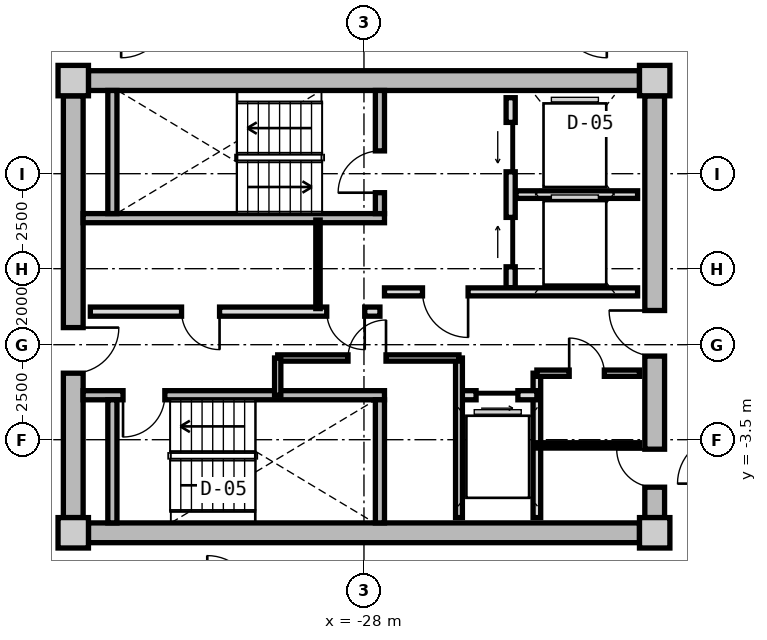
"""IFC4 building model, lengths in metres.
Left out: names, types, materials, properties, quantities, classifications, styles, units other than length and angle.
Written with IfcOpenShell. Run it as: python <this file> out.ifc"""

import sys

from ifc_helpers import new_model, si_unit, direction, frame, frame_2d, origin, origin_2d, place, context, subcontext, project, spatial, rectangle, extrude, source, transform, mapped, element, fill, save


model = new_model("IFC4")
c1 = context("Model", 3, precision=1e-05, world=origin(), true_north=direction((0.0, 1.0)))
c2 = subcontext(c1, "Body", "Model", "MODEL_VIEW")
j1 = project(units=[si_unit("LENGTHUNIT", "METRE"), si_unit("PLANEANGLEUNIT", "RADIAN")], contexts=[c1])
p1 = place(None, origin())
s1 = spatial("IfcSite", under=j1, at=p1, CompositionType="ELEMENT")
p2 = place(p1, origin())
s2 = spatial("IfcBuilding", under=s1, at=p2, CompositionType="ELEMENT")
p3 = place(p2, frame((0.0, 0.0, 226.1)))
s3 = spatial("IfcBuildingStorey", under=s2, at=p3, CompositionType="ELEMENT", Elevation=226.1)
m1 = source(origin(), c2, "Body", "SweptSolid", [
    extrude(rectangle(XDim=0.8, YDim=0.8, at=origin_2d()), origin(), (0.0, 0.0, 1.0), 3.05),
])
for number, where, z_axis, x_axis in (
    (1, (-35.65, -5.95, 0.0), (0.0, 0.0, 1.0), (1.0, 0.0, 0.0)),
    (2, (-20.35, -5.95, 0.0), (0.0, 0.0, 1.0), (1.0, 0.0, 0.0)),
    (3, (-20.35, 5.95, 0.0), (0.0, 0.0, 1.0), (1.0, 0.0, 0.0)),
    (4, (-35.65, 5.95, 0.0), (0.0, 0.0, 1.0), (1.0, 0.0, 0.0)),
):
    element("IfcColumn", number, at=place(p3, frame(where, z_axis=z_axis, x_axis=x_axis)), inside=s3, PredefinedType="COLUMN", context=c2, shape_type="MappedRepresentation", body=[
        mapped(m1, transform((0.0, 0.0, 0.0), x_axis=(1.0, 0.0, 0.0), y_axis=(0.0, 1.0, 0.0), z_axis=(0.0, 0.0, 1.0), scale=1.0)),
    ])
m2 = source(origin(), c2, "Body", "SweptSolid", [
    extrude(rectangle(XDim=14.5, YDim=0.52, at=frame_2d((7.25, 0.0))), origin(), (0.0, 0.0, 1.0), 2.76),
])
for number, where, z_axis, x_axis in (
    (5, (-35.25, 5.95, 0.0), (0.0, 0.0, 1.0), (1.0, 0.0, 0.0)),
    (6, (-20.75, -5.95, 0.0), (0.0, 0.0, 1.0), (-1.0, 0.0, 0.0)),
):
    element("IfcWall", number, at=place(p3, frame(where, z_axis=z_axis, x_axis=x_axis)), inside=s3, PredefinedType="SHEAR", context=c2, shape_type="MappedRepresentation", body=[
        mapped(m2, transform((0.0, 0.0, 0.0), x_axis=(1.0, 0.0, 0.0), y_axis=(0.0, 1.0, 0.0), z_axis=(0.0, 0.0, 1.0), scale=1.0)),
    ])
m3 = source(origin(), c2, "Body", "SweptSolid", [
    extrude(rectangle(XDim=11.1, YDim=0.52, at=frame_2d((5.55, 0.0))), origin(), (0.0, 0.0, 1.0), 2.76),
])
p4 = place(p3, frame((-35.65, -5.55, 0.0), z_axis=(0.0, 0.0, 1.0), x_axis=(0.0, 1.0, 0.0)))
e7 = element("IfcWall", 7, at=p4, inside=s3, PredefinedType="SHEAR", context=c2, shape_type="MappedRepresentation", body=[
    mapped(m3, transform((0.0, 0.0, 0.0), x_axis=(1.0, 0.0, 0.0), y_axis=(0.0, 1.0, 0.0), z_axis=(0.0, 0.0, 1.0), scale=1.0)),
])
p5 = place(p4, frame((3.8, 0.0, 0.0)))
e8 = element("IfcOpeningElement", 8, at=p5, cuts=e7, PredefinedType="OPENING", context=c2, shape_type="SweptSolid", body=[
    extrude(rectangle(XDim=1.2, YDim=2.15, at=frame_2d((0.6, 1.075))), frame((0.0, 0.27, 0.0), z_axis=(0.0, -1.0, 0.0), x_axis=(1.0, 0.0, 0.0)), (0.0, 0.0, 1.0), 0.54),
])
p6 = place(p3, frame((-20.35, 5.55, 0.0), z_axis=(0.0, 0.0, 1.0), x_axis=(0.0, -1.0, 0.0)))
e9 = element("IfcWall", 9, at=p6, inside=s3, PredefinedType="SHEAR", context=c2, shape_type="MappedRepresentation", body=[
    mapped(m3, transform((0.0, 0.0, 0.0), x_axis=(1.0, 0.0, 0.0), y_axis=(0.0, 1.0, 0.0), z_axis=(0.0, 0.0, 1.0), scale=1.0)),
])
p7 = place(p6, frame((5.65, 0.0, 0.0)))
e10 = element("IfcOpeningElement", 10, at=p7, cuts=e9, PredefinedType="OPENING", context=c2, shape_type="SweptSolid", body=[
    extrude(rectangle(XDim=1.2, YDim=2.15, at=frame_2d((0.6, 1.075))), frame((0.0, 0.27, 0.0), z_axis=(0.0, -1.0, 0.0), x_axis=(1.0, 0.0, 0.0)), (0.0, 0.0, 1.0), 0.54),
])
p8 = place(p6, frame((9.3, 0.0, 0.0)))
e11 = element("IfcOpeningElement", 11, at=p8, cuts=e9, PredefinedType="OPENING", context=c2, shape_type="SweptSolid", body=[
    extrude(rectangle(XDim=1.0, YDim=2.1, at=frame_2d((0.5, 1.05))), frame((0.0, 0.27, 0.0), z_axis=(0.0, -1.0, 0.0), x_axis=(1.0, 0.0, 0.0)), (0.0, 0.0, 1.0), 0.54),
])
m4 = source(origin(), c2, "Body", "SweptSolid", [
    extrude(rectangle(XDim=7.93, YDim=0.24, at=frame_2d((3.965, 0.0))), origin(), (0.0, 0.0, 1.0), 2.76),
])
p9 = place(p3, frame((-35.39, 2.33, 0.0), z_axis=(0.0, 0.0, 1.0), x_axis=(1.0, 0.0, 0.0)))
e12 = element("IfcWall", 12, at=p9, inside=s3, PredefinedType="PARTITIONING", context=c2, shape_type="MappedRepresentation", body=[
    mapped(m4, transform((0.0, 0.0, 0.0), x_axis=(1.0, 0.0, 0.0), y_axis=(0.0, 1.0, 0.0), z_axis=(0.0, 0.0, 1.0), scale=1.0)),
])
m5 = source(origin(), c2, "Body", "SweptSolid", [
    extrude(rectangle(XDim=3.24, YDim=0.24, at=frame_2d((1.62, 0.0))), origin(), (0.0, 0.0, 1.0), 2.76),
])
p10 = place(p3, frame((-34.62, 2.45, 0.0), z_axis=(0.0, 0.0, 1.0), x_axis=(0.0, 1.0, 0.0)))
e13 = element("IfcWall", 13, at=p10, inside=s3, PredefinedType="PARTITIONING", context=c2, shape_type="MappedRepresentation", body=[
    mapped(m5, transform((0.0, 0.0, 0.0), x_axis=(1.0, 0.0, 0.0), y_axis=(0.0, 1.0, 0.0), z_axis=(0.0, 0.0, 1.0), scale=1.0)),
])
p11 = place(p3, frame((-27.58, 2.45, 0.0), z_axis=(0.0, 0.0, 1.0), x_axis=(0.0, 1.0, 0.0)))
e14 = element("IfcWall", 14, at=p11, inside=s3, PredefinedType="PARTITIONING", context=c2, shape_type="MappedRepresentation", body=[
    mapped(m5, transform((0.0, 0.0, 0.0), x_axis=(1.0, 0.0, 0.0), y_axis=(0.0, 1.0, 0.0), z_axis=(0.0, 0.0, 1.0), scale=1.0)),
])
p12 = place(p11, frame((0.55, 0.0, 0.0)))
e15 = element("IfcOpeningElement", 15, at=p12, cuts=e14, PredefinedType="OPENING", context=c2, shape_type="SweptSolid", body=[
    extrude(rectangle(XDim=1.1, YDim=2.15, at=frame_2d((0.55, 1.075))), frame((0.0, 0.13, 0.0), z_axis=(0.0, -1.0, 0.0), x_axis=(1.0, 0.0, 0.0)), (0.0, 0.0, 1.0), 0.26),
])
p13 = place(p3, frame((-35.39, -2.33, 0.0), z_axis=(0.0, 0.0, 1.0), x_axis=(1.0, 0.0, 0.0)))
e16 = element("IfcWall", 16, at=p13, inside=s3, PredefinedType="PARTITIONING", context=c2, shape_type="MappedRepresentation", body=[
    mapped(m4, transform((0.0, 0.0, 0.0), x_axis=(1.0, 0.0, 0.0), y_axis=(0.0, 1.0, 0.0), z_axis=(0.0, 0.0, 1.0), scale=1.0)),
])
p14 = place(p13, frame((1.05, 0.0, 0.0)))
e17 = element("IfcOpeningElement", 17, at=p14, cuts=e16, PredefinedType="OPENING", context=c2, shape_type="SweptSolid", body=[
    extrude(rectangle(XDim=1.1, YDim=2.15, at=frame_2d((0.55, 1.075))), frame((0.0, 0.13, 0.0), z_axis=(0.0, -1.0, 0.0), x_axis=(1.0, 0.0, 0.0)), (0.0, 0.0, 1.0), 0.26),
])
for number, where, z_axis, x_axis in (
    (18, (-34.62, -5.69, 0.0), (0.0, 0.0, 1.0), (0.0, 1.0, 0.0)),
    (19, (-27.58, -5.69, 0.0), (0.0, 0.0, 1.0), (0.0, 1.0, 0.0)),
):
    element("IfcWall", number, at=place(p3, frame(where, z_axis=z_axis, x_axis=x_axis)), inside=s3, PredefinedType="PARTITIONING", context=c2, shape_type="MappedRepresentation", body=[
        mapped(m5, transform((0.0, 0.0, 0.0), x_axis=(1.0, 0.0, 0.0), y_axis=(0.0, 1.0, 0.0), z_axis=(0.0, 0.0, 1.0), scale=1.0)),
    ])
m6 = source(origin(), c2, "Body", "SweptSolid", [
    extrude(rectangle(XDim=5.0, YDim=0.24, at=frame_2d((2.5, 0.0))), origin(), (0.0, 0.0, 1.0), 2.745),
])
p15 = place(p3, frame((-24.14, 0.5, 0.0), z_axis=(0.0, 0.0, 1.0), x_axis=(0.0, 1.0, 0.0)))
e20 = element("IfcWall", 20, at=p15, inside=s3, PredefinedType="PARTITIONING", context=c2, shape_type="MappedRepresentation", body=[
    mapped(m6, transform((0.0, 0.0, 0.0), x_axis=(1.0, 0.0, 0.0), y_axis=(0.0, 1.0, 0.0), z_axis=(0.0, 0.0, 1.0), scale=1.0)),
])
p16 = place(p15, frame((3.05, 0.0, 0.0)))
e21 = element("IfcOpeningElement", 21, at=p16, cuts=e20, PredefinedType="OPENING", context=c2, shape_type="SweptSolid", body=[
    extrude(rectangle(XDim=1.3, YDim=2.2, at=frame_2d((0.65, 1.1))), frame((0.0, 0.13, 0.0), z_axis=(0.0, -1.0, 0.0), x_axis=(1.0, 0.0, 0.0)), (0.0, 0.0, 1.0), 0.26),
])
p17 = place(p15, frame((0.55, 0.0, 0.0)))
e22 = element("IfcOpeningElement", 22, at=p17, cuts=e20, PredefinedType="OPENING", context=c2, shape_type="SweptSolid", body=[
    extrude(rectangle(XDim=1.3, YDim=2.2, at=frame_2d((0.65, 1.1))), frame((0.0, 0.13, 0.0), z_axis=(0.0, -1.0, 0.0), x_axis=(1.0, 0.0, 0.0)), (0.0, 0.0, 1.0), 0.26),
])
m7 = source(origin(), c2, "Body", "SweptSolid", [
    extrude(rectangle(XDim=3.2, YDim=0.2, at=frame_2d((1.6, 0.0))), origin(), (0.0, 0.0, 1.0), 2.745),
])
p18 = place(p3, frame((-24.0, 2.95, 0.0), z_axis=(0.0, 0.0, 1.0), x_axis=(1.0, 0.0, 0.0)))
e23 = element("IfcWall", 23, at=p18, inside=s3, PredefinedType="PARTITIONING", context=c2, shape_type="MappedRepresentation", body=[
    mapped(m7, transform((0.0, 0.0, 0.0), x_axis=(1.0, 0.0, 0.0), y_axis=(0.0, 1.0, 0.0), z_axis=(0.0, 0.0, 1.0), scale=1.0)),
])
m8 = source(origin(), c2, "Body", "SweptSolid", [
    extrude(rectangle(XDim=6.66, YDim=0.21, at=frame_2d((3.33, 0.0))), origin(), (0.0, 0.0, 1.0), 2.745),
])
p19 = place(p3, frame((-27.46, 0.39, 0.0), z_axis=(0.0, 0.0, 1.0), x_axis=(1.0, 0.0, 0.0)))
e24 = element("IfcWall", 24, at=p19, inside=s3, PredefinedType="PARTITIONING", context=c2, shape_type="MappedRepresentation", body=[
    mapped(m8, transform((0.0, 0.0, 0.0), x_axis=(1.0, 0.0, 0.0), y_axis=(0.0, 1.0, 0.0), z_axis=(0.0, 0.0, 1.0), scale=1.0)),
])
p20 = place(p19, frame((1.0, 0.0, 0.0)))
e25 = element("IfcOpeningElement", 25, at=p20, cuts=e24, PredefinedType="OPENING", context=c2, shape_type="SweptSolid", body=[
    extrude(rectangle(XDim=1.2, YDim=2.15, at=frame_2d((0.6, 1.075))), frame((0.0, 0.115, 0.0), z_axis=(0.0, -1.0, 0.0), x_axis=(1.0, 0.0, 0.0)), (0.0, 0.0, 1.0), 0.23),
])
m9 = source(origin(), c2, "Body", "SweptSolid", [
    extrude(rectangle(XDim=7.62, YDim=0.24, at=frame_2d((3.81, 0.0))), origin(), (0.0, 0.0, 1.0), 2.745),
])
p21 = place(p3, frame((-35.2, -0.13, 0.0), z_axis=(0.0, 0.0, 1.0), x_axis=(1.0, 0.0, 0.0)))
e26 = element("IfcWall", 26, at=p21, inside=s3, PredefinedType="PARTITIONING", context=c2, shape_type="MappedRepresentation", body=[
    mapped(m9, transform((0.0, 0.0, 0.0), x_axis=(1.0, 0.0, 0.0), y_axis=(0.0, 1.0, 0.0), z_axis=(0.0, 0.0, 1.0), scale=1.0)),
])
p22 = place(p21, frame((6.22, 0.0, 0.0)))
e27 = element("IfcOpeningElement", 27, at=p22, cuts=e26, PredefinedType="OPENING", context=c2, shape_type="SweptSolid", body=[
    extrude(rectangle(XDim=1.0, YDim=2.1, at=frame_2d((0.5, 1.05))), frame((0.0, 0.13, 0.0), z_axis=(0.0, -1.0, 0.0), x_axis=(1.0, 0.0, 0.0)), (0.0, 0.0, 1.0), 0.26),
])
p23 = place(p21, frame((2.4, 0.0, 0.0)))
e28 = element("IfcOpeningElement", 28, at=p23, cuts=e26, PredefinedType="OPENING", context=c2, shape_type="SweptSolid", body=[
    extrude(rectangle(XDim=1.0, YDim=2.1, at=frame_2d((0.5, 1.05))), frame((0.0, 0.13, 0.0), z_axis=(0.0, -1.0, 0.0), x_axis=(1.0, 0.0, 0.0)), (0.0, 0.0, 1.0), 0.26),
])
m10 = source(origin(), c2, "Body", "SweptSolid", [
    extrude(rectangle(XDim=2.33, YDim=0.115, at=frame_2d((1.165, 0.0))), origin(), (0.0, 0.0, 1.0), 2.745),
])
p24 = place(p3, frame((-29.21, -0.05, 0.0), z_axis=(0.0, 0.0, 1.0), x_axis=(0.0, 1.0, 0.0)))
e29 = element("IfcWall", 29, at=p24, inside=s3, PredefinedType="PARTITIONING", context=c2, shape_type="MappedRepresentation", body=[
    mapped(m10, transform((0.0, 0.0, 0.0), x_axis=(1.0, 0.0, 0.0), y_axis=(0.0, 1.0, 0.0), z_axis=(0.0, 0.0, 1.0), scale=1.0)),
])
m11 = source(origin(), c2, "Body", "SweptSolid", [
    extrude(rectangle(XDim=3.8, YDim=0.2, at=frame_2d((1.9, 0.0))), origin(), (0.0, 0.0, 1.0), 2.745),
])
p25 = place(p3, frame((-23.45, -5.55, 0.0), z_axis=(0.0, 0.0, 1.0), x_axis=(0.0, 1.0, 0.0)))
e30 = element("IfcWall", 30, at=p25, inside=s3, PredefinedType="PARTITIONING", context=c2, shape_type="MappedRepresentation", body=[
    mapped(m11, transform((0.0, 0.0, 0.0), x_axis=(1.0, 0.0, 0.0), y_axis=(0.0, 1.0, 0.0), z_axis=(0.0, 0.0, 1.0), scale=1.0)),
])
m12 = source(origin(), c2, "Body", "SweptSolid", [
    extrude(rectangle(XDim=2.05, YDim=0.24, at=frame_2d((1.025, 0.0))), origin(), (0.0, 0.0, 1.0), 2.745),
])
p26 = place(p3, frame((-25.5, -2.33, 0.0), z_axis=(0.0, 0.0, 1.0), x_axis=(1.0, 0.0, 0.0)))
e31 = element("IfcWall", 31, at=p26, inside=s3, PredefinedType="PARTITIONING", context=c2, shape_type="MappedRepresentation", body=[
    mapped(m12, transform((0.0, 0.0, 0.0), x_axis=(1.0, 0.0, 0.0), y_axis=(0.0, 1.0, 0.0), z_axis=(0.0, 0.0, 1.0), scale=1.0)),
])
p27 = place(p26, frame((0.45, 0.0, 0.0)))
e32 = element("IfcOpeningElement", 32, at=p27, cuts=e31, PredefinedType="OPENING", context=c2, shape_type="SweptSolid", body=[
    extrude(rectangle(XDim=1.1, YDim=2.2, at=frame_2d((0.55, 1.1))), frame((0.0, 0.13, 0.0), z_axis=(0.0, -1.0, 0.0), x_axis=(1.0, 0.0, 0.0)), (0.0, 0.0, 1.0), 0.26),
])
m13 = source(origin(), c2, "Body", "SweptSolid", [
    extrude(rectangle(XDim=4.2, YDim=0.18, at=frame_2d((2.1, 0.0))), origin(), (0.0, 0.0, 1.0), 2.745),
])
p28 = place(p3, frame((-25.5, -5.55, 0.0), z_axis=(0.0, 0.0, 1.0), x_axis=(0.0, 1.0, 0.0)))
e33 = element("IfcWall", 33, at=p28, inside=s3, PredefinedType="PARTITIONING", context=c2, shape_type="MappedRepresentation", body=[
    mapped(m13, transform((0.0, 0.0, 0.0), x_axis=(1.0, 0.0, 0.0), y_axis=(0.0, 1.0, 0.0), z_axis=(0.0, 0.0, 1.0), scale=1.0)),
])
m14 = source(origin(), c2, "Body", "SweptSolid", [
    extrude(rectangle(XDim=4.77, YDim=0.165, at=frame_2d((2.385, 0.0))), origin(), (0.0, 0.0, 1.0), 2.745),
])
p29 = place(p3, frame((-30.27, -1.35, 0.0), z_axis=(0.0, 0.0, 1.0), x_axis=(1.0, 0.0, 0.0)))
e34 = element("IfcWall", 34, at=p29, inside=s3, PredefinedType="PARTITIONING", context=c2, shape_type="MappedRepresentation", body=[
    mapped(m14, transform((0.0, 0.0, 0.0), x_axis=(1.0, 0.0, 0.0), y_axis=(0.0, 1.0, 0.0), z_axis=(0.0, 0.0, 1.0), scale=1.0)),
])
p30 = place(p29, frame((1.85, 0.0, 0.0)))
e35 = element("IfcOpeningElement", 35, at=p30, cuts=e34, PredefinedType="OPENING", context=c2, shape_type="SweptSolid", body=[
    extrude(rectangle(XDim=1.0, YDim=2.1, at=frame_2d((0.5, 1.05))), frame((0.0, 0.093, 0.0), z_axis=(0.0, -1.0, 0.0), x_axis=(1.0, 0.0, 0.0)), (0.0, 0.0, 1.0), 0.185),
])
m15 = source(origin(), c2, "Body", "SweptSolid", [
    extrude(rectangle(XDim=0.98, YDim=0.165, at=frame_2d((0.49, 0.0))), origin(), (0.0, 0.0, 1.0), 2.745),
])
p31 = place(p3, frame((-30.27, -2.33, 0.0), z_axis=(0.0, 0.0, 1.0), x_axis=(0.0, 1.0, 0.0)))
e36 = element("IfcWall", 36, at=p31, inside=s3, PredefinedType="PARTITIONING", context=c2, shape_type="MappedRepresentation", body=[
    mapped(m15, transform((0.0, 0.0, 0.0), x_axis=(1.0, 0.0, 0.0), y_axis=(0.0, 1.0, 0.0), z_axis=(0.0, 0.0, 1.0), scale=1.0)),
])
m16 = source(origin(), c2, "Body", "SweptSolid", [
    extrude(rectangle(XDim=2.7, YDim=0.165, at=frame_2d((1.35, 0.0))), origin(), (0.0, 0.0, 1.0), 2.745),
])
p32 = place(p3, frame((-23.45, -1.75, 0.0), z_axis=(0.0, 0.0, 1.0), x_axis=(1.0, 0.0, 0.0)))
e37 = element("IfcWall", 37, at=p32, inside=s3, PredefinedType="PARTITIONING", context=c2, shape_type="MappedRepresentation", body=[
    mapped(m16, transform((0.0, 0.0, 0.0), x_axis=(1.0, 0.0, 0.0), y_axis=(0.0, 1.0, 0.0), z_axis=(0.0, 0.0, 1.0), scale=1.0)),
])
p33 = place(p32, frame((0.85, 0.0, 0.0)))
e38 = element("IfcOpeningElement", 38, at=p33, cuts=e37, PredefinedType="OPENING", context=c2, shape_type="SweptSolid", body=[
    extrude(rectangle(XDim=0.925, YDim=2.1, at=frame_2d((0.462, 1.05))), frame((0.0, 0.093, 0.0), z_axis=(0.0, -1.0, 0.0), x_axis=(1.0, 0.0, 0.0)), (0.0, 0.0, 1.0), 0.185),
])
m17 = source(origin(), c2, "Body", "SweptSolid", [
    extrude(rectangle(XDim=2.7, YDim=0.14, at=frame_2d((1.35, 0.0))), origin(), (0.0, 0.0, 1.0), 2.745),
])
p34 = place(p3, frame((-23.45, -3.65, 0.0), z_axis=(0.0, 0.0, 1.0), x_axis=(1.0, 0.0, 0.0)))
e39 = element("IfcWall", 39, at=p34, inside=s3, PredefinedType="PARTITIONING", context=c2, shape_type="MappedRepresentation", body=[
    mapped(m17, transform((0.0, 0.0, 0.0), x_axis=(1.0, 0.0, 0.0), y_axis=(0.0, 1.0, 0.0), z_axis=(0.0, 0.0, 1.0), scale=1.0)),
])
m18 = source(origin(), c2, "Body", "SweptSolid", [
    extrude(rectangle(XDim=1.1, YDim=2.15, at=frame_2d((0.55, 1.075))), frame((0.0, 0.025, 0.0), z_axis=(0.0, -1.0, 0.0), x_axis=(1.0, 0.0, 0.0)), (0.0, 0.0, 1.0), 0.05),
])
p35 = place(p12, origin())
e40 = element("IfcDoor", 40, at=p35, inside=s3, OperationType="SINGLE_SWING_LEFT", PredefinedType="DOOR", context=c2, shape_type="MappedRepresentation", body=[
    mapped(m18, transform((0.0, 0.0, 0.0), x_axis=(1.0, 0.0, 0.0), y_axis=(0.0, 1.0, 0.0), z_axis=(0.0, 0.0, 1.0), scale=1.0)),
])
fill(e15, e40)
p36 = place(p14, frame((1.1, 0.0, 0.0), z_axis=(0.0, 0.0, 1.0), x_axis=(-1.0, 0.0, 0.0)))
e41 = element("IfcDoor", 41, at=p36, inside=s3, OperationType="SINGLE_SWING_RIGHT", PredefinedType="DOOR", context=c2, shape_type="MappedRepresentation", body=[
    mapped(m18, transform((0.0, 0.0, 0.0), x_axis=(1.0, 0.0, 0.0), y_axis=(0.0, 1.0, 0.0), z_axis=(0.0, 0.0, 1.0), scale=1.0)),
])
fill(e17, e41)
m19 = source(origin(), c2, "Body", "SweptSolid", [
    extrude(rectangle(XDim=1.3, YDim=2.2, at=frame_2d((0.65, 1.1))), frame((0.0, 0.025, 0.0), z_axis=(0.0, -1.0, 0.0), x_axis=(1.0, 0.0, 0.0)), (0.0, 0.0, 1.0), 0.05),
])
p37 = place(p16, origin())
e42 = element("IfcDoor", 42, at=p37, inside=s3, OperationType="SLIDING_TO_LEFT", PredefinedType="DOOR", context=c2, shape_type="MappedRepresentation", body=[
    mapped(m19, transform((0.0, 0.0, 0.0), x_axis=(1.0, 0.0, 0.0), y_axis=(0.0, 1.0, 0.0), z_axis=(0.0, 0.0, 1.0), scale=1.0)),
])
fill(e21, e42)
p38 = place(p17, origin())
e43 = element("IfcDoor", 43, at=p38, inside=s3, OperationType="SLIDING_TO_RIGHT", PredefinedType="DOOR", context=c2, shape_type="MappedRepresentation", body=[
    mapped(m19, transform((0.0, 0.0, 0.0), x_axis=(1.0, 0.0, 0.0), y_axis=(0.0, 1.0, 0.0), z_axis=(0.0, 0.0, 1.0), scale=1.0)),
])
fill(e22, e43)
m20 = source(origin(), c2, "Body", "SweptSolid", [
    extrude(rectangle(XDim=1.2, YDim=2.15, at=frame_2d((0.6, 1.075))), frame((0.0, 0.025, 0.0), z_axis=(0.0, -1.0, 0.0), x_axis=(1.0, 0.0, 0.0)), (0.0, 0.0, 1.0), 0.05),
])
p39 = place(p20, frame((1.2, 0.0, 0.0), z_axis=(0.0, 0.0, 1.0), x_axis=(-1.0, 0.0, 0.0)))
e44 = element("IfcDoor", 44, at=p39, inside=s3, OperationType="SINGLE_SWING_LEFT", PredefinedType="DOOR", context=c2, shape_type="MappedRepresentation", body=[
    mapped(m20, transform((0.0, 0.0, 0.0), x_axis=(1.0, 0.0, 0.0), y_axis=(0.0, 1.0, 0.0), z_axis=(0.0, 0.0, 1.0), scale=1.0)),
])
fill(e25, e44)
p40 = place(p5, frame((1.2, 0.0, 0.0), z_axis=(0.0, 0.0, 1.0), x_axis=(-1.0, 0.0, 0.0)))
e45 = element("IfcDoor", 45, at=p40, inside=s3, OperationType="SINGLE_SWING_LEFT", PredefinedType="DOOR", context=c2, shape_type="MappedRepresentation", body=[
    mapped(m20, transform((0.0, 0.0, 0.0), x_axis=(1.0, 0.0, 0.0), y_axis=(0.0, 1.0, 0.0), z_axis=(0.0, 0.0, 1.0), scale=1.0)),
])
fill(e8, e45)
p41 = place(p7, frame((1.2, 0.0, 0.0), z_axis=(0.0, 0.0, 1.0), x_axis=(-1.0, 0.0, 0.0)))
e46 = element("IfcDoor", 46, at=p41, inside=s3, OperationType="SINGLE_SWING_RIGHT", PredefinedType="DOOR", context=c2, shape_type="MappedRepresentation", body=[
    mapped(m20, transform((0.0, 0.0, 0.0), x_axis=(1.0, 0.0, 0.0), y_axis=(0.0, 1.0, 0.0), z_axis=(0.0, 0.0, 1.0), scale=1.0)),
])
fill(e10, e46)
m21 = source(origin(), c2, "Body", "SweptSolid", [
    extrude(rectangle(XDim=1.0, YDim=2.1, at=frame_2d((0.5, 1.05))), frame((0.0, 0.025, 0.0), z_axis=(0.0, -1.0, 0.0), x_axis=(1.0, 0.0, 0.0)), (0.0, 0.0, 1.0), 0.05),
])
p42 = place(p22, frame((1.0, 0.0, 0.0), z_axis=(0.0, 0.0, 1.0), x_axis=(-1.0, 0.0, 0.0)))
e47 = element("IfcDoor", 47, at=p42, inside=s3, OperationType="SINGLE_SWING_LEFT", PredefinedType="DOOR", context=c2, shape_type="MappedRepresentation", body=[
    mapped(m21, transform((0.0, 0.0, 0.0), x_axis=(1.0, 0.0, 0.0), y_axis=(0.0, 1.0, 0.0), z_axis=(0.0, 0.0, 1.0), scale=1.0)),
])
fill(e27, e47)
p43 = place(p23, frame((1.0, 0.0, 0.0), z_axis=(0.0, 0.0, 1.0), x_axis=(-1.0, 0.0, 0.0)))
e48 = element("IfcDoor", 48, at=p43, inside=s3, OperationType="SINGLE_SWING_LEFT", PredefinedType="DOOR", context=c2, shape_type="MappedRepresentation", body=[
    mapped(m21, transform((0.0, 0.0, 0.0), x_axis=(1.0, 0.0, 0.0), y_axis=(0.0, 1.0, 0.0), z_axis=(0.0, 0.0, 1.0), scale=1.0)),
])
fill(e28, e48)
m22 = source(origin(), c2, "Body", "SweptSolid", [
    extrude(rectangle(XDim=1.1, YDim=2.2, at=frame_2d((0.55, 1.1))), frame((0.0, 0.025, 0.0), z_axis=(0.0, -1.0, 0.0), x_axis=(1.0, 0.0, 0.0)), (0.0, 0.0, 1.0), 0.05),
])
p44 = place(p27, frame((1.1, 0.0, 0.0), z_axis=(0.0, 0.0, 1.0), x_axis=(-1.0, 0.0, 0.0)))
e49 = element("IfcDoor", 49, at=p44, inside=s3, OperationType="SLIDING_TO_RIGHT", PredefinedType="DOOR", context=c2, shape_type="MappedRepresentation", body=[
    mapped(m22, transform((0.0, 0.0, 0.0), x_axis=(1.0, 0.0, 0.0), y_axis=(0.0, 1.0, 0.0), z_axis=(0.0, 0.0, 1.0), scale=1.0)),
])
fill(e32, e49)
p45 = place(p30, origin())
e50 = element("IfcDoor", 50, at=p45, inside=s3, OperationType="SINGLE_SWING_RIGHT", PredefinedType="DOOR", context=c2, shape_type="MappedRepresentation", body=[
    mapped(m21, transform((0.0, 0.0, 0.0), x_axis=(1.0, 0.0, 0.0), y_axis=(0.0, 1.0, 0.0), z_axis=(0.0, 0.0, 1.0), scale=1.0)),
])
fill(e35, e50)
m23 = source(origin(), c2, "Body", "SweptSolid", [
    extrude(rectangle(XDim=0.925, YDim=2.1, at=frame_2d((0.462, 1.05))), frame((0.0, 0.025, 0.0), z_axis=(0.0, -1.0, 0.0), x_axis=(1.0, 0.0, 0.0)), (0.0, 0.0, 1.0), 0.05),
])
p46 = place(p33, origin())
e51 = element("IfcDoor", 51, at=p46, inside=s3, OperationType="SINGLE_SWING_LEFT", PredefinedType="DOOR", context=c2, shape_type="MappedRepresentation", body=[
    mapped(m23, transform((0.0, 0.0, 0.0), x_axis=(1.0, 0.0, 0.0), y_axis=(0.0, 1.0, 0.0), z_axis=(0.0, 0.0, 1.0), scale=1.0)),
])
fill(e38, e51)
p47 = place(p8, frame((1.0, 0.0, 0.0), z_axis=(0.0, 0.0, 1.0), x_axis=(-1.0, 0.0, 0.0)))
e52 = element("IfcDoor", 52, at=p47, inside=s3, OperationType="SINGLE_SWING_RIGHT", PredefinedType="DOOR", context=c2, shape_type="MappedRepresentation", body=[
    mapped(m21, transform((0.0, 0.0, 0.0), x_axis=(1.0, 0.0, 0.0), y_axis=(0.0, 1.0, 0.0), z_axis=(0.0, 0.0, 1.0), scale=1.0)),
])
fill(e11, e52)
save(model, sys.argv[1])
